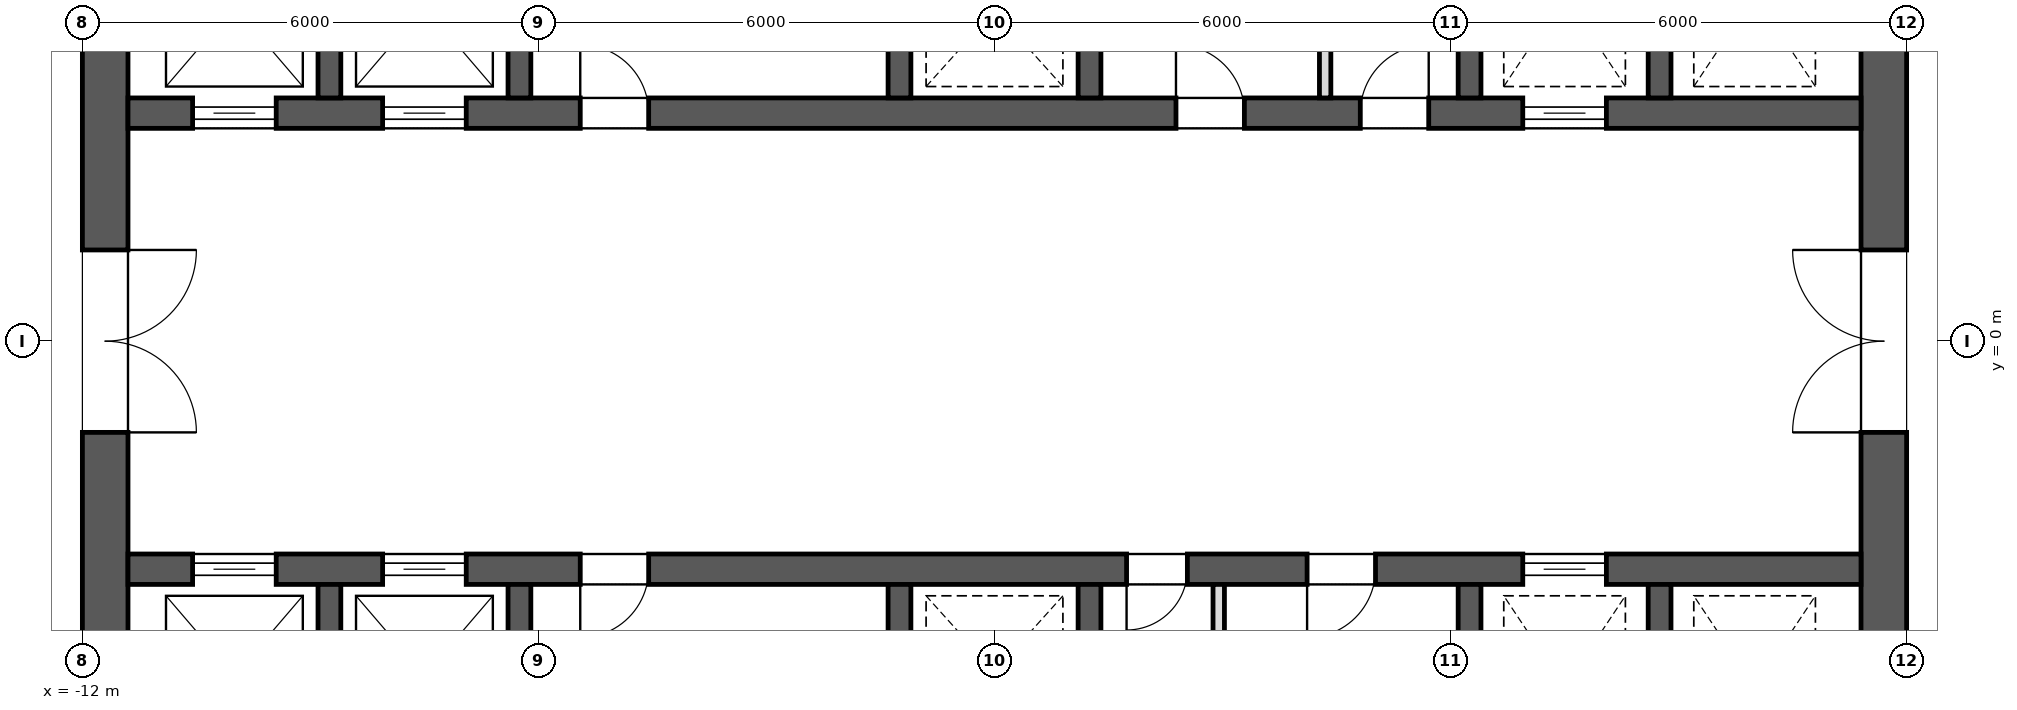
"""IFC4 building model, lengths in metres.
Left out: names, types, materials, properties, quantities, classifications, styles, units other than length and angle.
Written with IfcOpenShell. Run it as: python <this file> out.ifc"""

import sys

from ifc_helpers import new_model, si_unit, direction, frame, frame_2d, origin, place, context, subcontext, project, spatial, rectangle, extrude, element, fill, save


model = new_model("IFC4")
c1 = context("Model", 3, precision=1e-05, world=origin(), true_north=direction((0.0, 1.0)))
c2 = subcontext(c1, "Body", "Model", "MODEL_VIEW")
j1 = project(units=[si_unit("LENGTHUNIT", "METRE"), si_unit("PLANEANGLEUNIT", "RADIAN")], contexts=[c1])
p1 = place(None, origin())
s1 = spatial("IfcSite", under=j1, at=p1, CompositionType="ELEMENT")
p2 = place(p1, origin())
s2 = spatial("IfcBuilding", under=s1, at=p2, CompositionType="ELEMENT")
p3 = place(p2, frame((0.0, 0.0, 304.3)))
s3 = spatial("IfcBuildingStorey", under=s2, at=p3, CompositionType="ELEMENT", Elevation=304.3)
p4 = place(p3, frame((11.7, -11.4, 0.0), z_axis=(0.0, 0.0, 1.0), x_axis=(0.0, 1.0, 0.0)))
e1 = element("IfcWall", 1, at=p4, inside=s3, PredefinedType="SHEAR", context=c2, shape_type="SweptSolid", body=[
    extrude(rectangle(XDim=22.8, YDim=0.6, at=frame_2d((11.4, 0.0))), origin(), (0.0, 0.0, 1.0), 4.0),
])
p5 = place(p4, frame((10.2, 0.0, 0.0)))
e2 = element("IfcOpeningElement", 2, at=p5, cuts=e1, PredefinedType="OPENING", context=c2, shape_type="SweptSolid", body=[
    extrude(rectangle(XDim=2.4, YDim=2.1, at=frame_2d((1.2, 1.05))), frame((0.0, 0.312, 0.0), z_axis=(0.0, -1.0, 0.0), x_axis=(1.0, 0.0, 0.0)), (0.0, 0.0, 1.0), 0.624),
])
p6 = place(p4, frame((19.5, 0.0, 0.0)))
e3 = element("IfcOpeningElement", 3, at=p6, cuts=e1, PredefinedType="OPENING", context=c2, shape_type="SweptSolid", body=[
    extrude(rectangle(XDim=1.2, YDim=2.1, at=frame_2d((0.6, 1.05))), frame((0.0, 0.312, 0.0), z_axis=(0.0, -1.0, 0.0), x_axis=(1.0, 0.0, 0.0)), (0.0, 0.0, 1.0), 0.624),
])
p7 = place(p4, frame((2.1, 0.0, 0.0)))
e4 = element("IfcOpeningElement", 4, at=p7, cuts=e1, PredefinedType="OPENING", context=c2, shape_type="SweptSolid", body=[
    extrude(rectangle(XDim=1.2, YDim=2.1, at=frame_2d((0.6, 1.05))), frame((0.0, 0.312, 0.0), z_axis=(0.0, -1.0, 0.0), x_axis=(1.0, 0.0, 0.0)), (0.0, 0.0, 1.0), 0.624),
])
p8 = place(p3, frame((-11.7, -11.4, 0.0), z_axis=(0.0, 0.0, 1.0), x_axis=(0.0, 1.0, 0.0)))
e5 = element("IfcWall", 5, at=p8, inside=s3, PredefinedType="SHEAR", context=c2, shape_type="SweptSolid", body=[
    extrude(rectangle(XDim=22.8, YDim=0.6, at=frame_2d((11.4, 0.0))), origin(), (0.0, 0.0, 1.0), 4.0),
])
p9 = place(p8, frame((10.2, 0.0, 0.0)))
e6 = element("IfcOpeningElement", 6, at=p9, cuts=e5, PredefinedType="OPENING", context=c2, shape_type="SweptSolid", body=[
    extrude(rectangle(XDim=2.4, YDim=2.1, at=frame_2d((1.2, 1.05))), frame((0.0, 0.312, 0.0), z_axis=(0.0, -1.0, 0.0), x_axis=(1.0, 0.0, 0.0)), (0.0, 0.0, 1.0), 0.624),
])
p10 = place(p8, frame((18.925, 0.0, 0.0)))
e7 = element("IfcOpeningElement", 7, at=p10, cuts=e5, PredefinedType="OPENING", context=c2, shape_type="SweptSolid", body=[
    extrude(rectangle(XDim=1.2, YDim=2.1, at=frame_2d((0.6, 1.05))), frame((0.0, 0.312, 0.0), z_axis=(0.0, -1.0, 0.0), x_axis=(1.0, 0.0, 0.0)), (0.0, 0.0, 1.0), 0.624),
])
p11 = place(p8, frame((2.675, 0.0, 0.0)))
e8 = element("IfcOpeningElement", 8, at=p11, cuts=e5, PredefinedType="OPENING", context=c2, shape_type="SweptSolid", body=[
    extrude(rectangle(XDim=1.2, YDim=2.1, at=frame_2d((0.6, 1.05))), frame((0.0, 0.312, 0.0), z_axis=(0.0, -1.0, 0.0), x_axis=(1.0, 0.0, 0.0)), (0.0, 0.0, 1.0), 0.624),
])
p12 = place(p3, frame((-11.4, 3.0, 0.0), z_axis=(0.0, 0.0, 1.0), x_axis=(1.0, 0.0, 0.0)))
e9 = element("IfcWall", 9, at=p12, inside=s3, PredefinedType="SHEAR", context=c2, shape_type="SweptSolid", body=[
    extrude(rectangle(XDim=22.8, YDim=0.4, at=frame_2d((11.4, 0.0))), origin(), (0.0, 0.0, 1.0), 4.0),
])
p13 = place(p12, frame((0.85, 0.0, 0.0)))
e10 = element("IfcOpeningElement", 10, at=p13, cuts=e9, PredefinedType="OPENING", context=c2, shape_type="SweptSolid", body=[
    extrude(rectangle(XDim=1.1, YDim=2.1, at=frame_2d((0.55, 1.05))), frame((0.0, 0.212, 0.0), z_axis=(0.0, -1.0, 0.0), x_axis=(1.0, 0.0, 0.0)), (0.0, 0.0, 1.0), 0.424),
])
p14 = place(p12, frame((3.35, 0.0, 0.0)))
e11 = element("IfcOpeningElement", 11, at=p14, cuts=e9, PredefinedType="OPENING", context=c2, shape_type="SweptSolid", body=[
    extrude(rectangle(XDim=1.1, YDim=2.1, at=frame_2d((0.55, 1.05))), frame((0.0, 0.212, 0.0), z_axis=(0.0, -1.0, 0.0), x_axis=(1.0, 0.0, 0.0)), (0.0, 0.0, 1.0), 0.424),
])
p15 = place(p12, frame((18.35, 0.0, 0.0)))
e12 = element("IfcOpeningElement", 12, at=p15, cuts=e9, PredefinedType="OPENING", context=c2, shape_type="SweptSolid", body=[
    extrude(rectangle(XDim=1.1, YDim=2.1, at=frame_2d((0.55, 1.05))), frame((0.0, 0.212, 0.0), z_axis=(0.0, -1.0, 0.0), x_axis=(1.0, 0.0, 0.0)), (0.0, 0.0, 1.0), 0.424),
])
p16 = place(p12, frame((13.788, 0.0, 0.0)))
e13 = element("IfcOpeningElement", 13, at=p16, cuts=e9, PredefinedType="OPENING", context=c2, shape_type="SweptSolid", body=[
    extrude(rectangle(XDim=0.9, YDim=2.1, at=frame_2d((0.45, 1.05))), frame((0.0, 0.212, 0.0), z_axis=(0.0, -1.0, 0.0), x_axis=(1.0, 0.0, 0.0)), (0.0, 0.0, 1.0), 0.424),
])
p17 = place(p12, frame((16.212, 0.0, 0.0)))
e14 = element("IfcOpeningElement", 14, at=p17, cuts=e9, PredefinedType="OPENING", context=c2, shape_type="SweptSolid", body=[
    extrude(rectangle(XDim=0.9, YDim=2.1, at=frame_2d((0.45, 1.05))), frame((0.0, 0.212, 0.0), z_axis=(0.0, -1.0, 0.0), x_axis=(1.0, 0.0, 0.0)), (0.0, 0.0, 1.0), 0.424),
])
p18 = place(p12, frame((5.95, 0.0, 0.0)))
e15 = element("IfcOpeningElement", 15, at=p18, cuts=e9, PredefinedType="OPENING", context=c2, shape_type="SweptSolid", body=[
    extrude(rectangle(XDim=0.9, YDim=2.1, at=frame_2d((0.45, 1.05))), frame((0.0, 0.212, 0.0), z_axis=(0.0, -1.0, 0.0), x_axis=(1.0, 0.0, 0.0)), (0.0, 0.0, 1.0), 0.424),
])
for number, where, z_axis, x_axis in (
    (16, (-8.75, 3.2, 0.0), (0.0, 0.0, 1.0), (0.0, 1.0, 0.0)),
    (17, (-6.25, 3.2, 0.0), (0.0, 0.0, 1.0), (0.0, 1.0, 0.0)),
    (18, (-1.25, 3.2, 0.0), (0.0, 0.0, 1.0), (0.0, 1.0, 0.0)),
    (19, (1.25, 3.2, 0.0), (0.0, 0.0, 1.0), (0.0, 1.0, 0.0)),
    (20, (6.25, 3.2, 0.0), (0.0, 0.0, 1.0), (0.0, 1.0, 0.0)),
    (21, (8.75, 3.2, 0.0), (0.0, 0.0, 1.0), (0.0, 1.0, 0.0)),
):
    element("IfcWall", number, at=place(p3, frame(where, z_axis=z_axis, x_axis=x_axis)), inside=s3, PredefinedType="SHEAR", context=c2, shape_type="SweptSolid", body=[
        extrude(rectangle(XDim=2.9, YDim=0.3, at=frame_2d((1.45, 0.0))), origin(), (0.0, 0.0, 1.0), 4.0),
    ])
p19 = place(p3, frame((-11.4, -3.0, 0.0), z_axis=(0.0, 0.0, 1.0), x_axis=(1.0, 0.0, 0.0)))
e22 = element("IfcWall", 22, at=p19, inside=s3, PredefinedType="SHEAR", context=c2, shape_type="SweptSolid", body=[
    extrude(rectangle(XDim=22.8, YDim=0.4, at=frame_2d((11.4, 0.0))), origin(), (0.0, 0.0, 1.0), 4.0),
])
p20 = place(p19, frame((0.85, 0.0, 0.0)))
e23 = element("IfcOpeningElement", 23, at=p20, cuts=e22, PredefinedType="OPENING", context=c2, shape_type="SweptSolid", body=[
    extrude(rectangle(XDim=1.1, YDim=2.1, at=frame_2d((0.55, 1.05))), frame((0.0, 0.212, 0.0), z_axis=(0.0, -1.0, 0.0), x_axis=(1.0, 0.0, 0.0)), (0.0, 0.0, 1.0), 0.424),
])
p21 = place(p19, frame((3.35, 0.0, 0.0)))
e24 = element("IfcOpeningElement", 24, at=p21, cuts=e22, PredefinedType="OPENING", context=c2, shape_type="SweptSolid", body=[
    extrude(rectangle(XDim=1.1, YDim=2.1, at=frame_2d((0.55, 1.05))), frame((0.0, 0.212, 0.0), z_axis=(0.0, -1.0, 0.0), x_axis=(1.0, 0.0, 0.0)), (0.0, 0.0, 1.0), 0.424),
])
p22 = place(p19, frame((18.35, 0.0, 0.0)))
e25 = element("IfcOpeningElement", 25, at=p22, cuts=e22, PredefinedType="OPENING", context=c2, shape_type="SweptSolid", body=[
    extrude(rectangle(XDim=1.1, YDim=2.1, at=frame_2d((0.55, 1.05))), frame((0.0, 0.212, 0.0), z_axis=(0.0, -1.0, 0.0), x_axis=(1.0, 0.0, 0.0)), (0.0, 0.0, 1.0), 0.424),
])
p23 = place(p19, frame((13.137, 0.0, 0.0)))
e26 = element("IfcOpeningElement", 26, at=p23, cuts=e22, PredefinedType="OPENING", context=c2, shape_type="SweptSolid", body=[
    extrude(rectangle(XDim=0.8, YDim=2.1, at=frame_2d((0.4, 1.05))), frame((0.0, 0.212, 0.0), z_axis=(0.0, -1.0, 0.0), x_axis=(1.0, 0.0, 0.0)), (0.0, 0.0, 1.0), 0.424),
])
p24 = place(p19, frame((15.512, 0.0, 0.0)))
e27 = element("IfcOpeningElement", 27, at=p24, cuts=e22, PredefinedType="OPENING", context=c2, shape_type="SweptSolid", body=[
    extrude(rectangle(XDim=0.9, YDim=2.1, at=frame_2d((0.45, 1.05))), frame((0.0, 0.212, 0.0), z_axis=(0.0, -1.0, 0.0), x_axis=(1.0, 0.0, 0.0)), (0.0, 0.0, 1.0), 0.424),
])
p25 = place(p19, frame((5.95, 0.0, 0.0)))
e28 = element("IfcOpeningElement", 28, at=p25, cuts=e22, PredefinedType="OPENING", context=c2, shape_type="SweptSolid", body=[
    extrude(rectangle(XDim=0.9, YDim=2.1, at=frame_2d((0.45, 1.05))), frame((0.0, 0.212, 0.0), z_axis=(0.0, -1.0, 0.0), x_axis=(1.0, 0.0, 0.0)), (0.0, 0.0, 1.0), 0.424),
])
for number, where, z_axis, x_axis in (
    (29, (-8.75, -6.1, 0.0), (0.0, 0.0, 1.0), (0.0, 1.0, 0.0)),
    (30, (-6.25, -6.1, 0.0), (0.0, 0.0, 1.0), (0.0, 1.0, 0.0)),
    (31, (-1.25, -6.1, 0.0), (0.0, 0.0, 1.0), (0.0, 1.0, 0.0)),
    (32, (1.25, -6.1, 0.0), (0.0, 0.0, 1.0), (0.0, 1.0, 0.0)),
    (33, (6.25, -6.1, 0.0), (0.0, 0.0, 1.0), (0.0, 1.0, 0.0)),
    (34, (8.75, -6.1, 0.0), (0.0, 0.0, 1.0), (0.0, 1.0, 0.0)),
):
    element("IfcWall", number, at=place(p3, frame(where, z_axis=z_axis, x_axis=x_axis)), inside=s3, PredefinedType="SHEAR", context=c2, shape_type="SweptSolid", body=[
        extrude(rectangle(XDim=2.9, YDim=0.3, at=frame_2d((1.45, 0.0))), origin(), (0.0, 0.0, 1.0), 4.0),
    ])
for number, where, z_axis, x_axis in (
    (35, (4.35, 3.2, 0.0), (0.0, 0.0, 1.0), (0.0, 1.0, 0.0)),
    (36, (2.95, -6.1, 0.0), (0.0, 0.0, 1.0), (0.0, 1.0, 0.0)),
):
    element("IfcWall", number, at=place(p3, frame(where, z_axis=z_axis, x_axis=x_axis)), inside=s3, PredefinedType="PARTITIONING", context=c2, shape_type="SweptSolid", body=[
        extrude(rectangle(XDim=2.9, YDim=0.15, at=frame_2d((1.45, 0.0))), origin(), (0.0, 0.0, 1.0), 3.7),
    ])
p26 = place(p13, origin())
e37 = element("IfcDoor", 37, at=p26, inside=s3, OperationType="SLIDING_TO_LEFT", PredefinedType="DOOR", context=c2, shape_type="SweptSolid", body=[
    extrude(rectangle(XDim=1.1, YDim=2.1, at=frame_2d((0.55, 1.05))), frame((0.0, 0.025, 0.0), z_axis=(0.0, -1.0, 0.0), x_axis=(1.0, 0.0, 0.0)), (0.0, 0.0, 1.0), 0.05),
])
fill(e10, e37)
p27 = place(p14, origin())
e38 = element("IfcDoor", 38, at=p27, inside=s3, OperationType="SLIDING_TO_LEFT", PredefinedType="DOOR", context=c2, shape_type="SweptSolid", body=[
    extrude(rectangle(XDim=1.1, YDim=2.1, at=frame_2d((0.55, 1.05))), frame((0.0, 0.025, 0.0), z_axis=(0.0, -1.0, 0.0), x_axis=(1.0, 0.0, 0.0)), (0.0, 0.0, 1.0), 0.05),
])
fill(e11, e38)
p28 = place(p20, origin())
e39 = element("IfcDoor", 39, at=p28, inside=s3, OperationType="SLIDING_TO_LEFT", PredefinedType="DOOR", context=c2, shape_type="SweptSolid", body=[
    extrude(rectangle(XDim=1.1, YDim=2.1, at=frame_2d((0.55, 1.05))), frame((0.0, 0.025, 0.0), z_axis=(0.0, -1.0, 0.0), x_axis=(1.0, 0.0, 0.0)), (0.0, 0.0, 1.0), 0.05),
])
fill(e23, e39)
p29 = place(p21, origin())
e40 = element("IfcDoor", 40, at=p29, inside=s3, OperationType="SLIDING_TO_LEFT", PredefinedType="DOOR", context=c2, shape_type="SweptSolid", body=[
    extrude(rectangle(XDim=1.1, YDim=2.1, at=frame_2d((0.55, 1.05))), frame((0.0, 0.025, 0.0), z_axis=(0.0, -1.0, 0.0), x_axis=(1.0, 0.0, 0.0)), (0.0, 0.0, 1.0), 0.05),
])
fill(e24, e40)
p30 = place(p15, origin())
e41 = element("IfcDoor", 41, at=p30, inside=s3, OperationType="SLIDING_TO_LEFT", PredefinedType="DOOR", context=c2, shape_type="SweptSolid", body=[
    extrude(rectangle(XDim=1.1, YDim=2.1, at=frame_2d((0.55, 1.05))), frame((0.0, 0.025, 0.0), z_axis=(0.0, -1.0, 0.0), x_axis=(1.0, 0.0, 0.0)), (0.0, 0.0, 1.0), 0.05),
])
fill(e12, e41)
p31 = place(p22, origin())
e42 = element("IfcDoor", 42, at=p31, inside=s3, OperationType="SLIDING_TO_LEFT", PredefinedType="DOOR", context=c2, shape_type="SweptSolid", body=[
    extrude(rectangle(XDim=1.1, YDim=2.1, at=frame_2d((0.55, 1.05))), frame((0.0, 0.025, 0.0), z_axis=(0.0, -1.0, 0.0), x_axis=(1.0, 0.0, 0.0)), (0.0, 0.0, 1.0), 0.05),
])
fill(e25, e42)
p32 = place(p9, frame((2.4, 0.0, 0.0), z_axis=(0.0, 0.0, 1.0), x_axis=(-1.0, 0.0, 0.0)))
e43 = element("IfcDoor", 43, at=p32, inside=s3, OperationType="DOUBLE_DOOR_SINGLE_SWING", PredefinedType="DOOR", context=c2, shape_type="SweptSolid", body=[
    extrude(rectangle(XDim=2.4, YDim=2.1, at=frame_2d((1.2, 1.05))), frame((0.0, 0.025, 0.0), z_axis=(0.0, -1.0, 0.0), x_axis=(1.0, 0.0, 0.0)), (0.0, 0.0, 1.0), 0.05),
])
fill(e6, e43)
p33 = place(p5, origin())
e44 = element("IfcDoor", 44, at=p33, inside=s3, OperationType="DOUBLE_DOOR_SINGLE_SWING", PredefinedType="DOOR", context=c2, shape_type="SweptSolid", body=[
    extrude(rectangle(XDim=2.4, YDim=2.1, at=frame_2d((1.2, 1.05))), frame((0.0, 0.025, 0.0), z_axis=(0.0, -1.0, 0.0), x_axis=(1.0, 0.0, 0.0)), (0.0, 0.0, 1.0), 0.05),
])
fill(e2, e44)
p34 = place(p16, origin())
e45 = element("IfcDoor", 45, at=p34, inside=s3, OperationType="SINGLE_SWING_RIGHT", PredefinedType="DOOR", context=c2, shape_type="SweptSolid", body=[
    extrude(rectangle(XDim=0.9, YDim=2.1, at=frame_2d((0.45, 1.05))), frame((0.0, 0.025, 0.0), z_axis=(0.0, -1.0, 0.0), x_axis=(1.0, 0.0, 0.0)), (0.0, 0.0, 1.0), 0.05),
])
fill(e13, e45)
p35 = place(p17, origin())
e46 = element("IfcDoor", 46, at=p35, inside=s3, OperationType="SINGLE_SWING_LEFT", PredefinedType="DOOR", context=c2, shape_type="SweptSolid", body=[
    extrude(rectangle(XDim=0.9, YDim=2.1, at=frame_2d((0.45, 1.05))), frame((0.0, 0.025, 0.0), z_axis=(0.0, -1.0, 0.0), x_axis=(1.0, 0.0, 0.0)), (0.0, 0.0, 1.0), 0.05),
])
fill(e14, e46)
p36 = place(p18, origin())
e47 = element("IfcDoor", 47, at=p36, inside=s3, OperationType="SINGLE_SWING_RIGHT", PredefinedType="DOOR", context=c2, shape_type="SweptSolid", body=[
    extrude(rectangle(XDim=0.9, YDim=2.1, at=frame_2d((0.45, 1.05))), frame((0.0, 0.025, 0.0), z_axis=(0.0, -1.0, 0.0), x_axis=(1.0, 0.0, 0.0)), (0.0, 0.0, 1.0), 0.05),
])
fill(e15, e47)
p37 = place(p23, frame((0.8, 0.0, 0.0), z_axis=(0.0, 0.0, 1.0), x_axis=(-1.0, 0.0, 0.0)))
e48 = element("IfcDoor", 48, at=p37, inside=s3, OperationType="SINGLE_SWING_LEFT", PredefinedType="DOOR", context=c2, shape_type="SweptSolid", body=[
    extrude(rectangle(XDim=0.8, YDim=2.1, at=frame_2d((0.4, 1.05))), frame((0.0, 0.025, 0.0), z_axis=(0.0, -1.0, 0.0), x_axis=(1.0, 0.0, 0.0)), (0.0, 0.0, 1.0), 0.05),
])
fill(e26, e48)
p38 = place(p24, frame((0.9, 0.0, 0.0), z_axis=(0.0, 0.0, 1.0), x_axis=(-1.0, 0.0, 0.0)))
e49 = element("IfcDoor", 49, at=p38, inside=s3, OperationType="SINGLE_SWING_LEFT", PredefinedType="DOOR", context=c2, shape_type="SweptSolid", body=[
    extrude(rectangle(XDim=0.9, YDim=2.1, at=frame_2d((0.45, 1.05))), frame((0.0, 0.025, 0.0), z_axis=(0.0, -1.0, 0.0), x_axis=(1.0, 0.0, 0.0)), (0.0, 0.0, 1.0), 0.05),
])
fill(e27, e49)
p39 = place(p25, frame((0.9, 0.0, 0.0), z_axis=(0.0, 0.0, 1.0), x_axis=(-1.0, 0.0, 0.0)))
e50 = element("IfcDoor", 50, at=p39, inside=s3, OperationType="SINGLE_SWING_LEFT", PredefinedType="DOOR", context=c2, shape_type="SweptSolid", body=[
    extrude(rectangle(XDim=0.9, YDim=2.1, at=frame_2d((0.45, 1.05))), frame((0.0, 0.025, 0.0), z_axis=(0.0, -1.0, 0.0), x_axis=(1.0, 0.0, 0.0)), (0.0, 0.0, 1.0), 0.05),
])
fill(e28, e50)
save(model, sys.argv[1])
